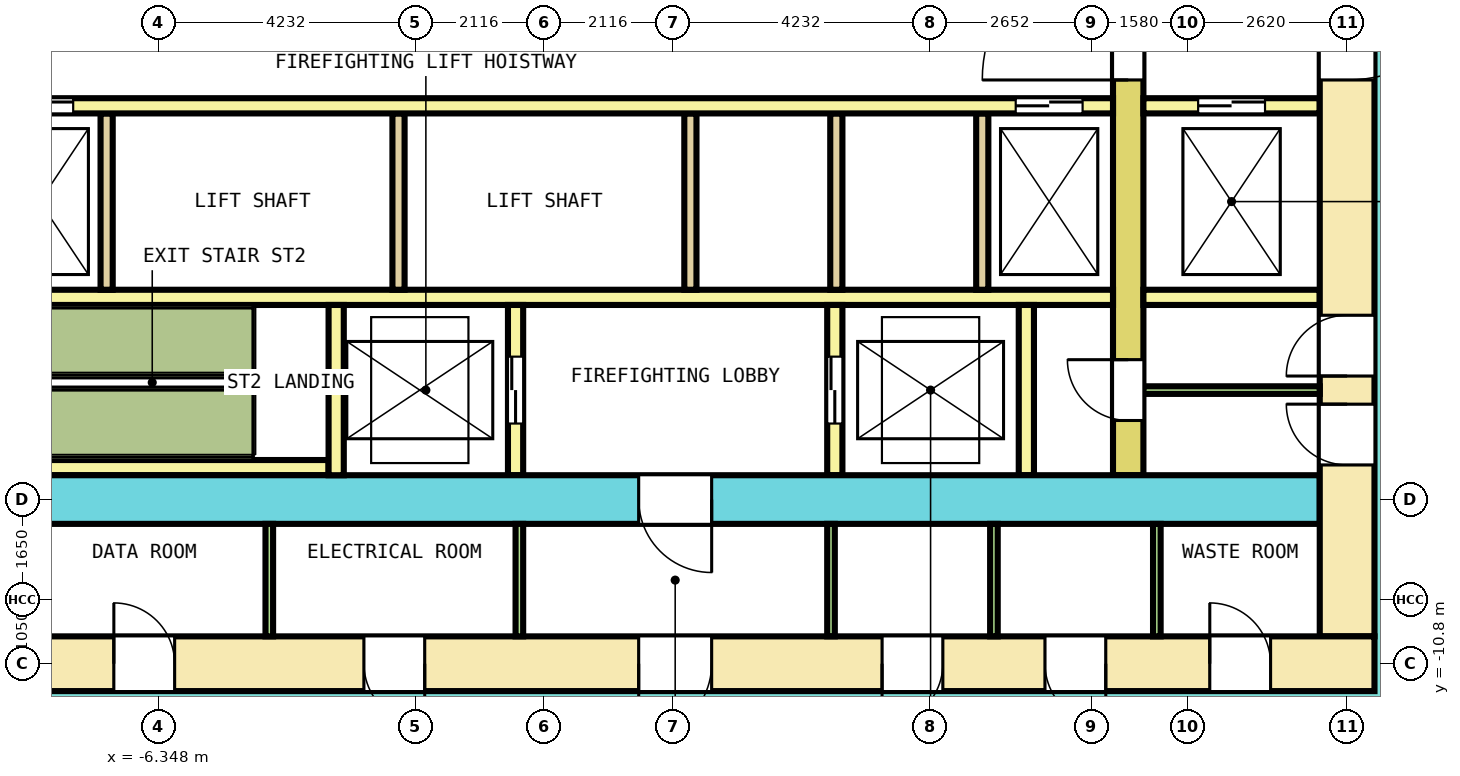
"""IFC4 building model, lengths in metres.
Left out: names, types, materials, properties, quantities, classifications, styles, units other than length and angle.
Written with IfcOpenShell. Run it as: python <this file> out.ifc"""

import sys

from ifc_helpers import new_model, si_unit, direction, frame, frame_2d, origin, place, context, subcontext, project, spatial, rectangle, extrude, element, fill, save


model = new_model("IFC4")
c1 = context("Model", 3, precision=1e-05, world=origin(), true_north=direction((0.0, 1.0)))
c2 = subcontext(c1, "Body", "Model", "MODEL_VIEW")
j1 = project(units=[si_unit("LENGTHUNIT", "METRE"), si_unit("PLANEANGLEUNIT", "RADIAN")], contexts=[c1])
p1 = place(None, origin())
s1 = spatial("IfcSite", under=j1, at=p1, CompositionType="ELEMENT")
p2 = place(p1, origin())
s2 = spatial("IfcBuilding", under=s1, at=p2, CompositionType="ELEMENT")
p3 = place(p2, frame((0.0, 0.0, 5.6)))
s3 = spatial("IfcBuildingStorey", under=s2, at=p3, CompositionType="ELEMENT", Elevation=5.6)
p4 = place(p3, frame((-13.65, -10.8, 0.0), z_axis=(0.0, 0.0, 1.0), x_axis=(1.0, 0.0, 0.0)))
e1 = element("IfcWall", 1, at=p4, inside=s3, PredefinedType="SHEAR", context=c2, shape_type="SweptSolid", body=[
    extrude(rectangle(XDim=27.3, YDim=0.9, at=frame_2d((13.65, 0.0))), origin(), (0.0, 0.0, 1.0), 4.3),
])
p5 = place(p4, frame((2.425, 0.0, 0.0)))
e2 = element("IfcOpeningElement", 2, at=p5, cuts=e1, PredefinedType="OPENING", context=c2, shape_type="SweptSolid", body=[
    extrude(rectangle(XDim=1.0, YDim=2.1, at=frame_2d((0.5, 1.05))), frame((0.0, 0.46, 0.0), z_axis=(0.0, -1.0, 0.0), x_axis=(1.0, 0.0, 0.0)), (0.0, 0.0, 1.0), 0.92),
])
p6 = place(p4, frame((6.569, 0.0, 0.0)))
e3 = element("IfcOpeningElement", 3, at=p6, cuts=e1, PredefinedType="OPENING", context=c2, shape_type="SweptSolid", body=[
    extrude(rectangle(XDim=1.0, YDim=2.1, at=frame_2d((0.5, 1.05))), frame((0.0, 0.46, 0.0), z_axis=(0.0, -1.0, 0.0), x_axis=(1.0, 0.0, 0.0)), (0.0, 0.0, 1.0), 0.92),
])
p7 = place(p4, frame((10.681, 0.0, 0.0)))
e4 = element("IfcOpeningElement", 4, at=p7, cuts=e1, PredefinedType="OPENING", context=c2, shape_type="SweptSolid", body=[
    extrude(rectangle(XDim=1.0, YDim=2.1, at=frame_2d((0.5, 1.05))), frame((0.0, 0.46, 0.0), z_axis=(0.0, -1.0, 0.0), x_axis=(1.0, 0.0, 0.0)), (0.0, 0.0, 1.0), 0.92),
])
p8 = place(p4, frame((19.202, 0.0, 0.0)))
e5 = element("IfcOpeningElement", 5, at=p8, cuts=e1, PredefinedType="OPENING", context=c2, shape_type="SweptSolid", body=[
    extrude(rectangle(XDim=1.0, YDim=2.1, at=frame_2d((0.5, 1.05))), frame((0.0, 0.46, 0.0), z_axis=(0.0, -1.0, 0.0), x_axis=(1.0, 0.0, 0.0)), (0.0, 0.0, 1.0), 0.92),
])
p9 = place(p4, frame((21.881, 0.0, 0.0)))
e6 = element("IfcOpeningElement", 6, at=p9, cuts=e1, PredefinedType="OPENING", context=c2, shape_type="SweptSolid", body=[
    extrude(rectangle(XDim=1.0, YDim=2.1, at=frame_2d((0.5, 1.05))), frame((0.0, 0.46, 0.0), z_axis=(0.0, -1.0, 0.0), x_axis=(1.0, 0.0, 0.0)), (0.0, 0.0, 1.0), 0.92),
])
p10 = place(p4, frame((24.592, 0.0, 0.0)))
e7 = element("IfcOpeningElement", 7, at=p10, cuts=e1, PredefinedType="OPENING", context=c2, shape_type="SweptSolid", body=[
    extrude(rectangle(XDim=1.0, YDim=2.1, at=frame_2d((0.5, 1.05))), frame((0.0, 0.46, 0.0), z_axis=(0.0, -1.0, 0.0), x_axis=(1.0, 0.0, 0.0)), (0.0, 0.0, 1.0), 0.92),
])
p11 = place(p4, frame((15.2, 0.0, 0.0)))
e8 = element("IfcOpeningElement", 8, at=p11, cuts=e1, PredefinedType="OPENING", context=c2, shape_type="SweptSolid", body=[
    extrude(rectangle(XDim=1.2, YDim=2.1, at=frame_2d((0.6, 1.05))), frame((0.0, 0.46, 0.0), z_axis=(0.0, -1.0, 0.0), x_axis=(1.0, 0.0, 0.0)), (0.0, 0.0, 1.0), 0.92),
])
p12 = place(p3, frame((13.2, -10.35, 0.0), z_axis=(0.0, 0.0, 1.0), x_axis=(0.0, 1.0, 0.0)))
e9 = element("IfcWall", 9, at=p12, inside=s3, PredefinedType="SHEAR", context=c2, shape_type="SweptSolid", body=[
    extrude(rectangle(XDim=20.7, YDim=0.9, at=frame_2d((10.35, 0.0))), origin(), (0.0, 0.0, 1.0), 4.3),
])
p13 = place(p12, frame((9.15, 0.0, 0.0)))
e10 = element("IfcOpeningElement", 10, at=p13, cuts=e9, PredefinedType="OPENING", context=c2, shape_type="SweptSolid", body=[
    extrude(rectangle(XDim=2.4, YDim=2.1, at=frame_2d((1.2, 1.05))), frame((0.0, 0.46, 0.0), z_axis=(0.0, -1.0, 0.0), x_axis=(1.0, 0.0, 0.0)), (0.0, 0.0, 1.0), 0.92),
])
p14 = place(p12, frame((16.05, 0.0, 0.0)))
e11 = element("IfcOpeningElement", 11, at=p14, cuts=e9, PredefinedType="OPENING", context=c2, shape_type="SweptSolid", body=[
    extrude(rectangle(XDim=1.2, YDim=2.1, at=frame_2d((0.6, 1.05))), frame((0.0, 0.46, 0.0), z_axis=(0.0, -1.0, 0.0), x_axis=(1.0, 0.0, 0.0)), (0.0, 0.0, 1.0), 0.92),
])
p15 = place(p12, frame((2.819, 0.0, 0.0)))
e12 = element("IfcOpeningElement", 12, at=p15, cuts=e9, PredefinedType="OPENING", context=c2, shape_type="SweptSolid", body=[
    extrude(rectangle(XDim=1.0, YDim=2.1, at=frame_2d((0.5, 1.05))), frame((0.0, 0.46, 0.0), z_axis=(0.0, -1.0, 0.0), x_axis=(1.0, 0.0, 0.0)), (0.0, 0.0, 1.0), 0.92),
])
p16 = place(p12, frame((4.281, 0.0, 0.0)))
e13 = element("IfcOpeningElement", 13, at=p16, cuts=e9, PredefinedType="OPENING", context=c2, shape_type="SweptSolid", body=[
    extrude(rectangle(XDim=1.0, YDim=2.1, at=frame_2d((0.5, 1.05))), frame((0.0, 0.46, 0.0), z_axis=(0.0, -1.0, 0.0), x_axis=(1.0, 0.0, 0.0)), (0.0, 0.0, 1.0), 0.92),
])
p17 = place(p3, frame((-12.75, -8.1, 0.0), z_axis=(0.0, 0.0, 1.0), x_axis=(1.0, 0.0, 0.0)))
e14 = element("IfcWall", 14, at=p17, inside=s3, PredefinedType="SHEAR", context=c2, shape_type="SweptSolid", body=[
    extrude(rectangle(XDim=25.5, YDim=0.8, at=frame_2d((12.75, 0.0))), origin(), (0.0, 0.0, 1.0), 4.3),
])
p18 = place(p17, frame((14.3, 0.0, 0.0)))
e15 = element("IfcOpeningElement", 15, at=p18, cuts=e14, PredefinedType="OPENING", context=c2, shape_type="SweptSolid", body=[
    extrude(rectangle(XDim=1.2, YDim=2.1, at=frame_2d((0.6, 1.05))), frame((0.0, 0.41, 0.0), z_axis=(0.0, -1.0, 0.0), x_axis=(1.0, 0.0, 0.0)), (0.0, 0.0, 1.0), 0.82),
])
p19 = place(p3, frame((9.6, -7.7, 0.0), z_axis=(0.0, 0.0, 1.0), x_axis=(0.0, 1.0, 0.0)))
e16 = element("IfcWall", 16, at=p19, inside=s3, PredefinedType="SHEAR", context=c2, shape_type="SweptSolid", body=[
    extrude(rectangle(XDim=15.4, YDim=0.5, at=frame_2d((7.7, 0.0))), origin(), (0.0, 0.0, 1.0), 4.3),
])
p20 = place(p19, frame((6.5, 0.0, 0.0)))
e17 = element("IfcOpeningElement", 17, at=p20, cuts=e16, PredefinedType="OPENING", context=c2, shape_type="SweptSolid", body=[
    extrude(rectangle(XDim=2.4, YDim=2.1, at=frame_2d((1.2, 1.05))), frame((0.0, 0.26, 0.0), z_axis=(0.0, -1.0, 0.0), x_axis=(1.0, 0.0, 0.0)), (0.0, 0.0, 1.0), 0.52),
])
p21 = place(p19, frame((13.4, 0.0, 0.0)))
e18 = element("IfcOpeningElement", 18, at=p21, cuts=e16, PredefinedType="OPENING", context=c2, shape_type="SweptSolid", body=[
    extrude(rectangle(XDim=1.2, YDim=2.1, at=frame_2d((0.6, 1.05))), frame((0.0, 0.26, 0.0), z_axis=(0.0, -1.0, 0.0), x_axis=(1.0, 0.0, 0.0)), (0.0, 0.0, 1.0), 0.52),
])
p22 = place(p19, frame((0.9, 0.0, 0.0)))
e19 = element("IfcOpeningElement", 19, at=p22, cuts=e16, PredefinedType="OPENING", context=c2, shape_type="SweptSolid", body=[
    extrude(rectangle(XDim=1.0, YDim=2.1, at=frame_2d((0.5, 1.05))), frame((0.0, 0.26, 0.0), z_axis=(0.0, -1.0, 0.0), x_axis=(1.0, 0.0, 0.0)), (0.0, 0.0, 1.0), 0.52),
])
p23 = place(p3, frame((-9.35, -1.625, 0.0), z_axis=(0.0, 0.0, 1.0), x_axis=(1.0, 0.0, 0.0)))
e20 = element("IfcWall", 20, at=p23, inside=s3, PredefinedType="SOLIDWALL", context=c2, shape_type="SweptSolid", body=[
    extrude(rectangle(XDim=18.7, YDim=0.25, at=frame_2d((9.35, 0.0))), origin(), (0.0, 0.0, 1.0), 4.3),
])
p24 = place(p23, frame((0.5, 0.0, 0.0)))
e21 = element("IfcOpeningElement", 21, at=p24, cuts=e20, PredefinedType="OPENING", context=c2, shape_type="SweptSolid", body=[
    extrude(rectangle(XDim=1.1, YDim=2.1, at=frame_2d((0.55, 1.05))), frame((0.0, 0.135, 0.0), z_axis=(0.0, -1.0, 0.0), x_axis=(1.0, 0.0, 0.0)), (0.0, 0.0, 1.0), 0.27),
])
p25 = place(p23, frame((17.1, 0.0, 0.0)))
e22 = element("IfcOpeningElement", 22, at=p25, cuts=e20, PredefinedType="OPENING", context=c2, shape_type="SweptSolid", body=[
    extrude(rectangle(XDim=1.1, YDim=2.1, at=frame_2d((0.55, 1.05))), frame((0.0, 0.135, 0.0), z_axis=(0.0, -1.0, 0.0), x_axis=(1.0, 0.0, 0.0)), (0.0, 0.0, 1.0), 0.27),
])
p26 = place(p3, frame((9.85, -1.625, 0.0), z_axis=(0.0, 0.0, 1.0), x_axis=(1.0, 0.0, 0.0)))
e23 = element("IfcWall", 23, at=p26, inside=s3, PredefinedType="SOLIDWALL", context=c2, shape_type="SweptSolid", body=[
    extrude(rectangle(XDim=2.9, YDim=0.25, at=frame_2d((1.45, 0.0))), origin(), (0.0, 0.0, 1.0), 4.3),
])
p27 = place(p26, frame((0.9, 0.0, 0.0)))
e24 = element("IfcOpeningElement", 24, at=p27, cuts=e23, PredefinedType="OPENING", context=c2, shape_type="SweptSolid", body=[
    extrude(rectangle(XDim=1.1, YDim=2.1, at=frame_2d((0.55, 1.05))), frame((0.0, 0.135, 0.0), z_axis=(0.0, -1.0, 0.0), x_axis=(1.0, 0.0, 0.0)), (0.0, 0.0, 1.0), 0.27),
])
p28 = place(p3, frame((-9.35, -4.775, 0.0), z_axis=(0.0, 0.0, 1.0), x_axis=(1.0, 0.0, 0.0)))
e25 = element("IfcWall", 25, at=p28, inside=s3, PredefinedType="SOLIDWALL", context=c2, shape_type="SweptSolid", body=[
    extrude(rectangle(XDim=18.7, YDim=0.25, at=frame_2d((9.35, 0.0))), origin(), (0.0, 0.0, 1.0), 4.3),
])
p29 = place(p3, frame((9.85, -4.775, 0.0), z_axis=(0.0, 0.0, 1.0), x_axis=(1.0, 0.0, 0.0)))
e26 = element("IfcWall", 26, at=p29, inside=s3, PredefinedType="SOLIDWALL", context=c2, shape_type="SweptSolid", body=[
    extrude(rectangle(XDim=2.9, YDim=0.25, at=frame_2d((1.45, 0.0))), origin(), (0.0, 0.0, 1.0), 4.3),
])
for number, where, z_axis, x_axis in (
    (27, (-7.2, -4.65, 0.0), (0.0, 0.0, 1.0), (0.0, 1.0, 0.0)),
    (28, (-2.4, -4.65, 0.0), (0.0, 0.0, 1.0), (0.0, 1.0, 0.0)),
    (29, (2.4, -4.65, 0.0), (0.0, 0.0, 1.0), (0.0, 1.0, 0.0)),
    (30, (4.8, -4.65, 0.0), (0.0, 0.0, 1.0), (0.0, 1.0, 0.0)),
    (31, (7.2, -4.65, 0.0), (0.0, 0.0, 1.0), (0.0, 1.0, 0.0)),
):
    element("IfcWall", number, at=place(p3, frame(where, z_axis=z_axis, x_axis=x_axis)), inside=s3, PredefinedType="SOLIDWALL", context=c2, shape_type="SweptSolid", body=[
        extrude(rectangle(XDim=2.9, YDim=0.2, at=frame_2d((1.45, 0.0))), origin(), (0.0, 0.0, 1.0), 4.3),
    ])
p30 = place(p3, frame((-9.35, -7.575, 0.0), z_axis=(0.0, 0.0, 1.0), x_axis=(1.0, 0.0, 0.0)))
e32 = element("IfcWall", 32, at=p30, inside=s3, PredefinedType="SOLIDWALL", context=c2, shape_type="SweptSolid", body=[
    extrude(rectangle(XDim=5.8, YDim=0.25, at=frame_2d((2.9, 0.0))), origin(), (0.0, 0.0, 1.0), 4.3),
])
p31 = place(p3, frame((-3.425, -7.7, 0.0), z_axis=(0.0, 0.0, 1.0), x_axis=(0.0, 1.0, 0.0)))
e33 = element("IfcWall", 33, at=p31, inside=s3, PredefinedType="SOLIDWALL", context=c2, shape_type="SweptSolid", body=[
    extrude(rectangle(XDim=2.8, YDim=0.25, at=frame_2d((1.4, 0.0))), origin(), (0.0, 0.0, 1.0), 4.3),
])
p32 = place(p3, frame((-0.475, -7.7, 0.0), z_axis=(0.0, 0.0, 1.0), x_axis=(0.0, 1.0, 0.0)))
e34 = element("IfcWall", 34, at=p32, inside=s3, PredefinedType="SOLIDWALL", context=c2, shape_type="SweptSolid", body=[
    extrude(rectangle(XDim=2.8, YDim=0.25, at=frame_2d((1.4, 0.0))), origin(), (0.0, 0.0, 1.0), 4.3),
])
p33 = place(p32, frame((0.85, 0.0, 0.0)))
e35 = element("IfcOpeningElement", 35, at=p33, cuts=e34, PredefinedType="OPENING", context=c2, shape_type="SweptSolid", body=[
    extrude(rectangle(XDim=1.1, YDim=2.1, at=frame_2d((0.55, 1.05))), frame((0.0, 0.135, 0.0), z_axis=(0.0, -1.0, 0.0), x_axis=(1.0, 0.0, 0.0)), (0.0, 0.0, 1.0), 0.27),
])
p34 = place(p3, frame((4.775, -7.7, 0.0), z_axis=(0.0, 0.0, 1.0), x_axis=(0.0, 1.0, 0.0)))
e36 = element("IfcWall", 36, at=p34, inside=s3, PredefinedType="SOLIDWALL", context=c2, shape_type="SweptSolid", body=[
    extrude(rectangle(XDim=2.8, YDim=0.25, at=frame_2d((1.4, 0.0))), origin(), (0.0, 0.0, 1.0), 4.3),
])
p35 = place(p34, frame((0.85, 0.0, 0.0)))
e37 = element("IfcOpeningElement", 37, at=p35, cuts=e36, PredefinedType="OPENING", context=c2, shape_type="SweptSolid", body=[
    extrude(rectangle(XDim=1.1, YDim=2.1, at=frame_2d((0.55, 1.05))), frame((0.0, 0.135, 0.0), z_axis=(0.0, -1.0, 0.0), x_axis=(1.0, 0.0, 0.0)), (0.0, 0.0, 1.0), 0.27),
])
p36 = place(p3, frame((7.925, -7.7, 0.0), z_axis=(0.0, 0.0, 1.0), x_axis=(0.0, 1.0, 0.0)))
e38 = element("IfcWall", 38, at=p36, inside=s3, PredefinedType="SOLIDWALL", context=c2, shape_type="SweptSolid", body=[
    extrude(rectangle(XDim=2.8, YDim=0.25, at=frame_2d((1.4, 0.0))), origin(), (0.0, 0.0, 1.0), 4.3),
])
p37 = place(p3, frame((9.85, -6.3, 0.0), z_axis=(0.0, 0.0, 1.0), x_axis=(1.0, 0.0, 0.0)))
e39 = element("IfcWall", 39, at=p37, inside=s3, PredefinedType="PARTITIONING", context=c2, shape_type="SweptSolid", body=[
    extrude(rectangle(XDim=2.9, YDim=0.125, at=frame_2d((1.45, 0.0))), origin(), (0.0, 0.0, 1.0), 4.3),
])
for number, where, z_axis, x_axis in (
    (40, (-4.525, -10.35, 0.0), (0.0, 0.0, 1.0), (0.0, 1.0, 0.0)),
    (41, (-0.413, -10.35, 0.0), (0.0, 0.0, 1.0), (0.0, 1.0, 0.0)),
    (42, (4.712, -10.35, 0.0), (0.0, 0.0, 1.0), (0.0, 1.0, 0.0)),
    (43, (7.392, -10.35, 0.0), (0.0, 0.0, 1.0), (0.0, 1.0, 0.0)),
    (44, (10.071, -10.35, 0.0), (0.0, 0.0, 1.0), (0.0, 1.0, 0.0)),
):
    element("IfcWall", number, at=place(p3, frame(where, z_axis=z_axis, x_axis=x_axis)), inside=s3, PredefinedType="PARTITIONING", context=c2, shape_type="SweptSolid", body=[
        extrude(rectangle(XDim=1.85, YDim=0.125, at=frame_2d((0.925, 0.0))), origin(), (0.0, 0.0, 1.0), 4.3),
    ])
p38 = place(p24, origin())
e45 = element("IfcDoor", 45, at=p38, inside=s3, OperationType="DOUBLE_DOOR_SLIDING", PredefinedType="DOOR", context=c2, shape_type="SweptSolid", body=[
    extrude(rectangle(XDim=1.1, YDim=2.1, at=frame_2d((0.55, 1.05))), frame((0.0, 0.075, 0.0), z_axis=(0.0, -1.0, 0.0), x_axis=(1.0, 0.0, 0.0)), (0.0, 0.0, 1.0), 0.15),
])
fill(e21, e45)
p39 = place(p25, origin())
e46 = element("IfcDoor", 46, at=p39, inside=s3, OperationType="DOUBLE_DOOR_SLIDING", PredefinedType="DOOR", context=c2, shape_type="SweptSolid", body=[
    extrude(rectangle(XDim=1.1, YDim=2.1, at=frame_2d((0.55, 1.05))), frame((0.0, 0.075, 0.0), z_axis=(0.0, -1.0, 0.0), x_axis=(1.0, 0.0, 0.0)), (0.0, 0.0, 1.0), 0.15),
])
fill(e22, e46)
p40 = place(p27, origin())
e47 = element("IfcDoor", 47, at=p40, inside=s3, OperationType="DOUBLE_DOOR_SLIDING", PredefinedType="DOOR", context=c2, shape_type="SweptSolid", body=[
    extrude(rectangle(XDim=1.1, YDim=2.1, at=frame_2d((0.55, 1.05))), frame((0.0, 0.075, 0.0), z_axis=(0.0, -1.0, 0.0), x_axis=(1.0, 0.0, 0.0)), (0.0, 0.0, 1.0), 0.15),
])
fill(e24, e47)
p41 = place(p33, origin())
e48 = element("IfcDoor", 48, at=p41, inside=s3, OperationType="DOUBLE_DOOR_SLIDING", PredefinedType="DOOR", context=c2, shape_type="SweptSolid", body=[
    extrude(rectangle(XDim=1.1, YDim=2.1, at=frame_2d((0.55, 1.05))), frame((0.0, 0.075, 0.0), z_axis=(0.0, -1.0, 0.0), x_axis=(1.0, 0.0, 0.0)), (0.0, 0.0, 1.0), 0.15),
])
fill(e35, e48)
p42 = place(p35, origin())
e49 = element("IfcDoor", 49, at=p42, inside=s3, OperationType="DOUBLE_DOOR_SLIDING", PredefinedType="DOOR", context=c2, shape_type="SweptSolid", body=[
    extrude(rectangle(XDim=1.1, YDim=2.1, at=frame_2d((0.55, 1.05))), frame((0.0, 0.075, 0.0), z_axis=(0.0, -1.0, 0.0), x_axis=(1.0, 0.0, 0.0)), (0.0, 0.0, 1.0), 0.15),
])
fill(e37, e49)
p43 = place(p20, origin())
e50 = element("IfcDoor", 50, at=p43, inside=s3, OperationType="DOUBLE_DOOR_SINGLE_SWING", PredefinedType="DOOR", context=c2, shape_type="SweptSolid", body=[
    extrude(rectangle(XDim=2.4, YDim=2.1, at=frame_2d((1.2, 1.05))), frame((0.0, 0.2, 0.0), z_axis=(0.0, -1.0, 0.0), x_axis=(1.0, 0.0, 0.0)), (0.0, 0.0, 1.0), 0.4),
])
fill(e17, e50)
p44 = place(p13, origin())
e51 = element("IfcDoor", 51, at=p44, inside=s3, OperationType="DOUBLE_DOOR_SINGLE_SWING", PredefinedType="DOOR", context=c2, shape_type="SweptSolid", body=[
    extrude(rectangle(XDim=2.4, YDim=2.1, at=frame_2d((1.2, 1.05))), frame((0.0, 0.3, 0.0), z_axis=(0.0, -1.0, 0.0), x_axis=(1.0, 0.0, 0.0)), (0.0, 0.0, 1.0), 0.6),
])
fill(e10, e51)
p45 = place(p18, origin())
e52 = element("IfcDoor", 52, at=p45, inside=s3, OperationType="SINGLE_SWING_LEFT", PredefinedType="DOOR", context=c2, shape_type="SweptSolid", body=[
    extrude(rectangle(XDim=1.2, YDim=2.1, at=frame_2d((0.6, 1.05))), frame((0.0, 0.3, 0.0), z_axis=(0.0, -1.0, 0.0), x_axis=(1.0, 0.0, 0.0)), (0.0, 0.0, 1.0), 0.6),
])
fill(e15, e52)
p46 = place(p22, origin())
e53 = element("IfcDoor", 53, at=p46, inside=s3, OperationType="SINGLE_SWING_LEFT", PredefinedType="DOOR", context=c2, shape_type="SweptSolid", body=[
    extrude(rectangle(XDim=1.0, YDim=2.1, at=frame_2d((0.5, 1.05))), frame((0.0, 0.2, 0.0), z_axis=(0.0, -1.0, 0.0), x_axis=(1.0, 0.0, 0.0)), (0.0, 0.0, 1.0), 0.4),
])
fill(e19, e53)
p47 = place(p15, origin())
e54 = element("IfcDoor", 54, at=p47, inside=s3, OperationType="SINGLE_SWING_RIGHT", PredefinedType="DOOR", context=c2, shape_type="SweptSolid", body=[
    extrude(rectangle(XDim=1.0, YDim=2.1, at=frame_2d((0.5, 1.05))), frame((0.0, 0.3, 0.0), z_axis=(0.0, -1.0, 0.0), x_axis=(1.0, 0.0, 0.0)), (0.0, 0.0, 1.0), 0.6),
])
fill(e12, e54)
p48 = place(p16, origin())
e55 = element("IfcDoor", 55, at=p48, inside=s3, OperationType="SINGLE_SWING_LEFT", PredefinedType="DOOR", context=c2, shape_type="SweptSolid", body=[
    extrude(rectangle(XDim=1.0, YDim=2.1, at=frame_2d((0.5, 1.05))), frame((0.0, 0.3, 0.0), z_axis=(0.0, -1.0, 0.0), x_axis=(1.0, 0.0, 0.0)), (0.0, 0.0, 1.0), 0.6),
])
fill(e13, e55)
p49 = place(p6, origin())
e56 = element("IfcDoor", 56, at=p49, inside=s3, OperationType="SINGLE_SWING_LEFT", PredefinedType="DOOR", context=c2, shape_type="SweptSolid", body=[
    extrude(rectangle(XDim=1.0, YDim=2.1, at=frame_2d((0.5, 1.05))), frame((0.0, 0.3, 0.0), z_axis=(0.0, -1.0, 0.0), x_axis=(1.0, 0.0, 0.0)), (0.0, 0.0, 1.0), 0.6),
])
fill(e3, e56)
p50 = place(p7, origin())
e57 = element("IfcDoor", 57, at=p50, inside=s3, OperationType="SINGLE_SWING_RIGHT", PredefinedType="DOOR", context=c2, shape_type="SweptSolid", body=[
    extrude(rectangle(XDim=1.0, YDim=2.1, at=frame_2d((0.5, 1.05))), frame((0.0, 0.3, 0.0), z_axis=(0.0, -1.0, 0.0), x_axis=(1.0, 0.0, 0.0)), (0.0, 0.0, 1.0), 0.6),
])
fill(e4, e57)
p51 = place(p8, origin())
e58 = element("IfcDoor", 58, at=p51, inside=s3, OperationType="SINGLE_SWING_LEFT", PredefinedType="DOOR", context=c2, shape_type="SweptSolid", body=[
    extrude(rectangle(XDim=1.0, YDim=2.1, at=frame_2d((0.5, 1.05))), frame((0.0, 0.3, 0.0), z_axis=(0.0, -1.0, 0.0), x_axis=(1.0, 0.0, 0.0)), (0.0, 0.0, 1.0), 0.6),
])
fill(e5, e58)
p52 = place(p9, origin())
e59 = element("IfcDoor", 59, at=p52, inside=s3, OperationType="SINGLE_SWING_RIGHT", PredefinedType="DOOR", context=c2, shape_type="SweptSolid", body=[
    extrude(rectangle(XDim=1.0, YDim=2.1, at=frame_2d((0.5, 1.05))), frame((0.0, 0.3, 0.0), z_axis=(0.0, -1.0, 0.0), x_axis=(1.0, 0.0, 0.0)), (0.0, 0.0, 1.0), 0.6),
])
fill(e6, e59)
p53 = place(p10, origin())
e60 = element("IfcDoor", 60, at=p53, inside=s3, OperationType="SINGLE_SWING_LEFT", PredefinedType="DOOR", context=c2, shape_type="SweptSolid", body=[
    extrude(rectangle(XDim=1.0, YDim=2.1, at=frame_2d((0.5, 1.05))), frame((0.0, 0.3, 0.0), z_axis=(0.0, -1.0, 0.0), x_axis=(1.0, 0.0, 0.0)), (0.0, 0.0, 1.0), 0.6),
])
fill(e7, e60)
p54 = place(p11, origin())
e61 = element("IfcDoor", 61, at=p54, inside=s3, OperationType="SINGLE_SWING_RIGHT", PredefinedType="DOOR", context=c2, shape_type="SweptSolid", body=[
    extrude(rectangle(XDim=1.2, YDim=2.1, at=frame_2d((0.6, 1.05))), frame((0.0, 0.3, 0.0), z_axis=(0.0, -1.0, 0.0), x_axis=(1.0, 0.0, 0.0)), (0.0, 0.0, 1.0), 0.6),
])
fill(e8, e61)
save(model, sys.argv[1])
